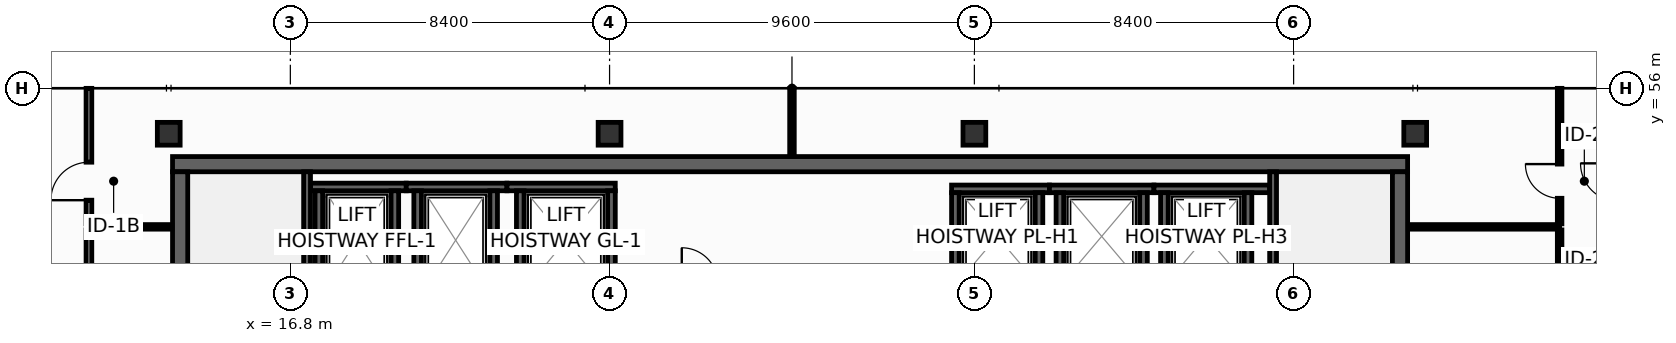
"""IFC4 building model, lengths in metres.
Left out: names, types, materials, properties, quantities, classifications, styles, units other than length and angle.
Written with IfcOpenShell. Run it as: python <this file> out.ifc"""

import sys

from ifc_helpers import new_model, si_unit, direction, frame, frame_2d, origin, origin_2d, place, context, subcontext, project, spatial, rectangle, hollow_rectangle, extrude, element, fill, save


model = new_model("IFC4")
c1 = context("Model", 3, precision=1e-05, world=origin(), true_north=direction((0.0, 1.0)))
c2 = subcontext(c1, "Body", "Model", "MODEL_VIEW")
j1 = project(units=[si_unit("LENGTHUNIT", "METRE"), si_unit("PLANEANGLEUNIT", "RADIAN")], contexts=[c1])
p1 = place(None, origin())
s1 = spatial("IfcSite", under=j1, at=p1, CompositionType="ELEMENT")
p2 = place(p1, origin())
s2 = spatial("IfcBuilding", under=s1, at=p2, CompositionType="ELEMENT")
p3 = place(p2, frame((0.0, 0.0, 310.4)))
s3 = spatial("IfcBuildingStorey", under=s2, at=p3, CompositionType="ELEMENT", Elevation=310.4)
p4 = place(p3, frame((13.7, 54.0, 0.0), z_axis=(0.0, 0.0, 1.0), x_axis=(1.0, 0.0, 0.0)))
e1 = element("IfcWall", 1, at=p4, inside=s3, PredefinedType="SHEAR", context=c2, shape_type="SweptSolid", body=[
    extrude(rectangle(XDim=32.5, YDim=0.4, at=frame_2d((16.25, 0.0))), origin(), (0.0, 0.0, 1.0), 3.55),
])
for number, where, z_axis, x_axis in (
    (2, (13.9, 43.4, 0.0), (0.0, 0.0, 1.0), (0.0, 1.0, 0.0)),
    (3, (46.0, 43.4, 0.0), (0.0, 0.0, 1.0), (0.0, 1.0, 0.0)),
):
    element("IfcWall", number, at=place(p3, frame(where, z_axis=z_axis, x_axis=x_axis)), inside=s3, PredefinedType="SHEAR", context=c2, shape_type="SweptSolid", body=[
        extrude(rectangle(XDim=10.4, YDim=0.4, at=frame_2d((5.2, 0.0))), origin(), (0.0, 0.0, 1.0), 3.55),
    ])
for number, where, z_axis, x_axis in (
    (4, (13.6, 54.8, 0.0), (0.0, 0.0, 1.0), (1.0, 0.0, 0.0)),
    (5, (25.2, 54.8, 0.0), (0.0, 0.0, 1.0), (1.0, 0.0, 0.0)),
    (6, (34.8, 54.8, 0.0), (0.0, 0.0, 1.0), (1.0, 0.0, 0.0)),
    (7, (46.4, 54.8, 0.0), (0.0, 0.0, 1.0), (1.0, 0.0, 0.0)),
):
    element("IfcColumn", number, at=place(p3, frame(where, z_axis=z_axis, x_axis=x_axis)), inside=s3, PredefinedType="COLUMN", context=c2, shape_type="SweptSolid", body=[
        extrude(hollow_rectangle(XDim=0.6, YDim=0.6, WallThickness=0.028, at=origin_2d()), origin(), (0.0, 0.0, 1.0), 3.8),
    ])
p5 = place(p3, frame((17.33, 53.4, 0.0), z_axis=(0.0, 0.0, 1.0), x_axis=(1.0, 0.0, 0.0)))
e8 = element("IfcWall", 8, at=p5, inside=s3, PredefinedType="SHEAR", context=c2, shape_type="SweptSolid", body=[
    extrude(rectangle(XDim=2.52, YDim=0.2, at=frame_2d((1.26, 0.0))), origin(), (0.0, 0.0, 1.0), 3.55),
])
for number, where, z_axis, x_axis in (
    (9, (17.55, 50.7, 0.0), (0.0, 0.0, 1.0), (0.0, 1.0, 0.0)),
    (10, (19.55, 50.7, 0.0), (0.0, 0.0, 1.0), (0.0, 1.0, 0.0)),
):
    element("IfcWall", number, at=place(p3, frame(where, z_axis=z_axis, x_axis=x_axis)), inside=s3, PredefinedType="SHEAR", context=c2, shape_type="SweptSolid", body=[
        extrude(rectangle(XDim=2.6, YDim=0.2, at=frame_2d((1.3, 0.0))), origin(), (0.0, 0.0, 1.0), 3.55),
    ])
p6 = place(p3, frame((19.85, 53.4, 0.0), z_axis=(0.0, 0.0, 1.0), x_axis=(1.0, 0.0, 0.0)))
e11 = element("IfcWall", 11, at=p6, inside=s3, PredefinedType="SHEAR", context=c2, shape_type="SweptSolid", body=[
    extrude(rectangle(XDim=2.65, YDim=0.2, at=frame_2d((1.325, 0.0))), origin(), (0.0, 0.0, 1.0), 3.55),
])
for number, where, z_axis, x_axis in (
    (12, (20.15, 50.7, 0.0), (0.0, 0.0, 1.0), (0.0, 1.0, 0.0)),
    (13, (22.15, 50.7, 0.0), (0.0, 0.0, 1.0), (0.0, 1.0, 0.0)),
):
    element("IfcWall", number, at=place(p3, frame(where, z_axis=z_axis, x_axis=x_axis)), inside=s3, PredefinedType="SHEAR", context=c2, shape_type="SweptSolid", body=[
        extrude(rectangle(XDim=2.6, YDim=0.2, at=frame_2d((1.3, 0.0))), origin(), (0.0, 0.0, 1.0), 3.55),
    ])
p7 = place(p3, frame((22.5, 53.4, 0.0), z_axis=(0.0, 0.0, 1.0), x_axis=(1.0, 0.0, 0.0)))
e14 = element("IfcWall", 14, at=p7, inside=s3, PredefinedType="SHEAR", context=c2, shape_type="SweptSolid", body=[
    extrude(rectangle(XDim=2.85, YDim=0.2, at=frame_2d((1.425, 0.0))), origin(), (0.0, 0.0, 1.0), 3.55),
])
for number, where, z_axis, x_axis in (
    (15, (22.85, 50.7, 0.0), (0.0, 0.0, 1.0), (0.0, 1.0, 0.0)),
    (16, (25.25, 50.7, 0.0), (0.0, 0.0, 1.0), (0.0, 1.0, 0.0)),
):
    element("IfcWall", number, at=place(p3, frame(where, z_axis=z_axis, x_axis=x_axis)), inside=s3, PredefinedType="SHEAR", context=c2, shape_type="SweptSolid", body=[
        extrude(rectangle(XDim=2.6, YDim=0.2, at=frame_2d((1.3, 0.0))), origin(), (0.0, 0.0, 1.0), 3.55),
    ])
p8 = place(p3, frame((34.2, 53.35, 0.0), z_axis=(0.0, 0.0, 1.0), x_axis=(1.0, 0.0, 0.0)))
e17 = element("IfcWall", 17, at=p8, inside=s3, PredefinedType="SHEAR", context=c2, shape_type="SweptSolid", body=[
    extrude(rectangle(XDim=2.575, YDim=0.2, at=frame_2d((1.288, 0.0))), origin(), (0.0, 0.0, 1.0), 3.55),
])
for number, where, z_axis, x_axis in (
    (18, (34.3, 50.95, 0.0), (0.0, 0.0, 1.0), (0.0, 1.0, 0.0)),
    (19, (36.5, 50.95, 0.0), (0.0, 0.0, 1.0), (0.0, 1.0, 0.0)),
):
    element("IfcWall", number, at=place(p3, frame(where, z_axis=z_axis, x_axis=x_axis)), inside=s3, PredefinedType="SHEAR", context=c2, shape_type="SweptSolid", body=[
        extrude(rectangle(XDim=2.3, YDim=0.2, at=frame_2d((1.15, 0.0))), origin(), (0.0, 0.0, 1.0), 3.55),
    ])
p9 = place(p3, frame((36.775, 53.35, 0.0), z_axis=(0.0, 0.0, 1.0), x_axis=(1.0, 0.0, 0.0)))
e20 = element("IfcWall", 20, at=p9, inside=s3, PredefinedType="SHEAR", context=c2, shape_type="SweptSolid", body=[
    extrude(rectangle(XDim=2.75, YDim=0.2, at=frame_2d((1.375, 0.0))), origin(), (0.0, 0.0, 1.0), 3.55),
])
for number, where, z_axis, x_axis in (
    (21, (37.05, 50.95, 0.0), (0.0, 0.0, 1.0), (0.0, 1.0, 0.0)),
    (22, (39.25, 50.95, 0.0), (0.0, 0.0, 1.0), (0.0, 1.0, 0.0)),
):
    element("IfcWall", number, at=place(p3, frame(where, z_axis=z_axis, x_axis=x_axis)), inside=s3, PredefinedType="SHEAR", context=c2, shape_type="SweptSolid", body=[
        extrude(rectangle(XDim=2.3, YDim=0.2, at=frame_2d((1.15, 0.0))), origin(), (0.0, 0.0, 1.0), 3.55),
    ])
p10 = place(p3, frame((39.525, 53.35, 0.0), z_axis=(0.0, 0.0, 1.0), x_axis=(1.0, 0.0, 0.0)))
e23 = element("IfcWall", 23, at=p10, inside=s3, PredefinedType="SHEAR", context=c2, shape_type="SweptSolid", body=[
    extrude(rectangle(XDim=3.045, YDim=0.2, at=frame_2d((1.522, 0.0))), origin(), (0.0, 0.0, 1.0), 3.55),
])
for number, where, z_axis, x_axis in (
    (24, (39.8, 50.95, 0.0), (0.0, 0.0, 1.0), (0.0, 1.0, 0.0)),
    (25, (42.0, 50.95, 0.0), (0.0, 0.0, 1.0), (0.0, 1.0, 0.0)),
):
    element("IfcWall", number, at=place(p3, frame(where, z_axis=z_axis, x_axis=x_axis)), inside=s3, PredefinedType="SHEAR", context=c2, shape_type="SweptSolid", body=[
        extrude(rectangle(XDim=2.3, YDim=0.2, at=frame_2d((1.15, 0.0))), origin(), (0.0, 0.0, 1.0), 3.55),
    ])
p11 = place(p3, frame((17.24, 43.4, 0.0), z_axis=(0.0, 0.0, 1.0), x_axis=(0.0, 1.0, 0.0)))
e26 = element("IfcWall", 26, at=p11, inside=s3, PredefinedType="SHEAR", context=c2, shape_type="SweptSolid", body=[
    extrude(rectangle(XDim=10.4, YDim=0.18, at=frame_2d((5.2, 0.0))), origin(), (0.0, 0.0, 1.0), 3.55),
])
p12 = place(p11, frame((0.16, 0.0, 0.0)))
e27 = element("IfcOpeningElement", 27, at=p12, cuts=e26, PredefinedType="OPENING", context=c2, shape_type="SweptSolid", body=[
    extrude(rectangle(XDim=1.0, YDim=2.15, at=frame_2d((0.5, 1.075))), frame((0.0, 0.1, 0.0), z_axis=(0.0, -1.0, 0.0), x_axis=(1.0, 0.0, 0.0)), (0.0, 0.0, 1.0), 0.2),
])
p13 = place(p3, frame((42.66, 53.8, 0.0), z_axis=(0.0, 0.0, 1.0), x_axis=(0.0, -1.0, 0.0)))
e28 = element("IfcWall", 28, at=p13, inside=s3, PredefinedType="SHEAR", context=c2, shape_type="SweptSolid", body=[
    extrude(rectangle(XDim=10.4, YDim=0.18, at=frame_2d((5.2, 0.0))), origin(), (0.0, 0.0, 1.0), 3.55),
])
p14 = place(p13, frame((8.99, 0.0, 0.0)))
e29 = element("IfcOpeningElement", 29, at=p14, cuts=e28, PredefinedType="OPENING", context=c2, shape_type="SweptSolid", body=[
    extrude(rectangle(XDim=1.1, YDim=2.15, at=frame_2d((0.55, 1.075))), frame((0.0, 0.1, 0.0), z_axis=(0.0, -1.0, 0.0), x_axis=(1.0, 0.0, 0.0)), (0.0, 0.0, 1.0), 0.2),
])
p15 = place(p3, frame((46.22, 52.35, 0.0), z_axis=(0.0, 0.0, 1.0), x_axis=(1.0, 0.0, 0.0)))
e30 = element("IfcWall", 30, at=p15, inside=s3, PredefinedType="PARTITIONING", context=c2, shape_type="SweptSolid", body=[
    extrude(rectangle(XDim=3.98, YDim=0.12, at=frame_2d((1.99, 0.0))), origin(), (0.0, 0.0, 1.0), 3.55),
])
p16 = place(p3, frame((11.5, 52.35, 0.0), z_axis=(0.0, 0.0, 1.0), x_axis=(1.0, 0.0, 0.0)))
e31 = element("IfcWall", 31, at=p16, inside=s3, PredefinedType="PARTITIONING", context=c2, shape_type="SweptSolid", body=[
    extrude(rectangle(XDim=2.18, YDim=0.12, at=frame_2d((1.09, 0.0))), origin(), (0.0, 0.0, 1.0), 3.55),
])
p17 = place(p3, frame((30.0, 54.22, 0.0), z_axis=(0.0, 0.0, 1.0), x_axis=(0.0, 1.0, 0.0)))
e32 = element("IfcWall", 32, at=p17, inside=s3, PredefinedType="PARTITIONING", context=c2, shape_type="SweptSolid", body=[
    extrude(rectangle(XDim=1.775, YDim=0.12, at=frame_2d((0.888, 0.0))), origin(), (0.0, 0.0, 1.0), 2.935),
])
p18 = place(p3, frame((50.2, 48.29, 0.0), z_axis=(0.0, 0.0, 1.0), x_axis=(0.0, 1.0, 0.0)))
e33 = element("IfcWall", 33, at=p18, inside=s3, PredefinedType="PARTITIONING", context=c2, shape_type="SweptSolid", body=[
    extrude(rectangle(XDim=3.98, YDim=0.12, at=frame_2d((1.99, 0.0))), origin(), (0.0, 0.0, 1.0), 3.55),
])
p19 = place(p18, frame((1.54, 0.0, 0.0)))
e34 = element("IfcOpeningElement", 34, at=p19, cuts=e33, PredefinedType="OPENING", context=c2, shape_type="SweptSolid", body=[
    extrude(rectangle(XDim=0.9, YDim=2.1, at=frame_2d((0.45, 1.05))), frame((0.0, 0.07, 0.0), z_axis=(0.0, -1.0, 0.0), x_axis=(1.0, 0.0, 0.0)), (0.0, 0.0, 1.0), 0.14),
])
p20 = place(p3, frame((50.2, 52.43, 0.0), z_axis=(0.0, 0.0, 1.0), x_axis=(0.0, 1.0, 0.0)))
e35 = element("IfcWall", 35, at=p20, inside=s3, PredefinedType="PARTITIONING", context=c2, shape_type="SweptSolid", body=[
    extrude(rectangle(XDim=3.565, YDim=0.12, at=frame_2d((1.783, 0.0))), origin(), (0.0, 0.0, 1.0), 2.935),
])
p21 = place(p20, frame((0.672, 0.0, 0.0)))
e36 = element("IfcOpeningElement", 36, at=p21, cuts=e35, PredefinedType="OPENING", context=c2, shape_type="SweptSolid", body=[
    extrude(rectangle(XDim=0.9, YDim=2.1, at=frame_2d((0.45, 1.05))), frame((0.0, 0.07, 0.0), z_axis=(0.0, -1.0, 0.0), x_axis=(1.0, 0.0, 0.0)), (0.0, 0.0, 1.0), 0.14),
])
p22 = place(p3, frame((11.5, 52.43, 0.0), z_axis=(0.0, 0.0, 1.0), x_axis=(0.0, 1.0, 0.0)))
e37 = element("IfcWall", 37, at=p22, inside=s3, PredefinedType="PARTITIONING", context=c2, shape_type="SweptSolid", body=[
    extrude(rectangle(XDim=3.565, YDim=0.15, at=frame_2d((1.783, 0.0))), origin(), (0.0, 0.0, 1.0), 2.935),
])
p23 = place(p22, frame((0.622, 0.0, 0.0)))
e38 = element("IfcOpeningElement", 38, at=p23, cuts=e37, PredefinedType="OPENING", context=c2, shape_type="SweptSolid", body=[
    extrude(rectangle(XDim=1.0, YDim=2.15, at=frame_2d((0.5, 1.075))), frame((0.0, 0.085, 0.0), z_axis=(0.0, -1.0, 0.0), x_axis=(1.0, 0.0, 0.0)), (0.0, 0.0, 1.0), 0.17),
])
p24 = place(p3, frame((11.5, 46.48, 0.0), z_axis=(0.0, 0.0, 1.0), x_axis=(0.0, 1.0, 0.0)))
e39 = element("IfcWall", 39, at=p24, inside=s3, PredefinedType="PARTITIONING", context=c2, shape_type="SweptSolid", body=[
    extrude(rectangle(XDim=5.79, YDim=0.15, at=frame_2d((2.895, 0.0))), origin(), (0.0, 0.0, 1.0), 3.55),
])
p25 = place(p24, frame((2.395, 0.0, 0.0)))
e40 = element("IfcOpeningElement", 40, at=p25, cuts=e39, PredefinedType="OPENING", context=c2, shape_type="SweptSolid", body=[
    extrude(rectangle(XDim=1.0, YDim=2.15, at=frame_2d((0.5, 1.075))), frame((0.0, 0.085, 0.0), z_axis=(0.0, -1.0, 0.0), x_axis=(1.0, 0.0, 0.0)), (0.0, 0.0, 1.0), 0.17),
])
p26 = place(p21, origin())
e41 = element("IfcDoor", 41, at=p26, inside=s3, OperationType="SINGLE_SWING_RIGHT", PredefinedType="DOOR", context=c2, shape_type="SweptSolid", body=[
    extrude(rectangle(XDim=0.9, YDim=2.1, at=frame_2d((0.45, 1.05))), frame((0.0, 0.025, 0.0), z_axis=(0.0, -1.0, 0.0), x_axis=(1.0, 0.0, 0.0)), (0.0, 0.0, 1.0), 0.05),
])
fill(e36, e41)
p27 = place(p23, origin())
e42 = element("IfcDoor", 42, at=p27, inside=s3, OperationType="SINGLE_SWING_LEFT", PredefinedType="DOOR", context=c2, shape_type="SweptSolid", body=[
    extrude(rectangle(XDim=1.0, YDim=2.15, at=frame_2d((0.5, 1.075))), frame((0.0, 0.025, 0.0), z_axis=(0.0, -1.0, 0.0), x_axis=(1.0, 0.0, 0.0)), (0.0, 0.0, 1.0), 0.05),
])
fill(e38, e42)
save(model, sys.argv[1])
